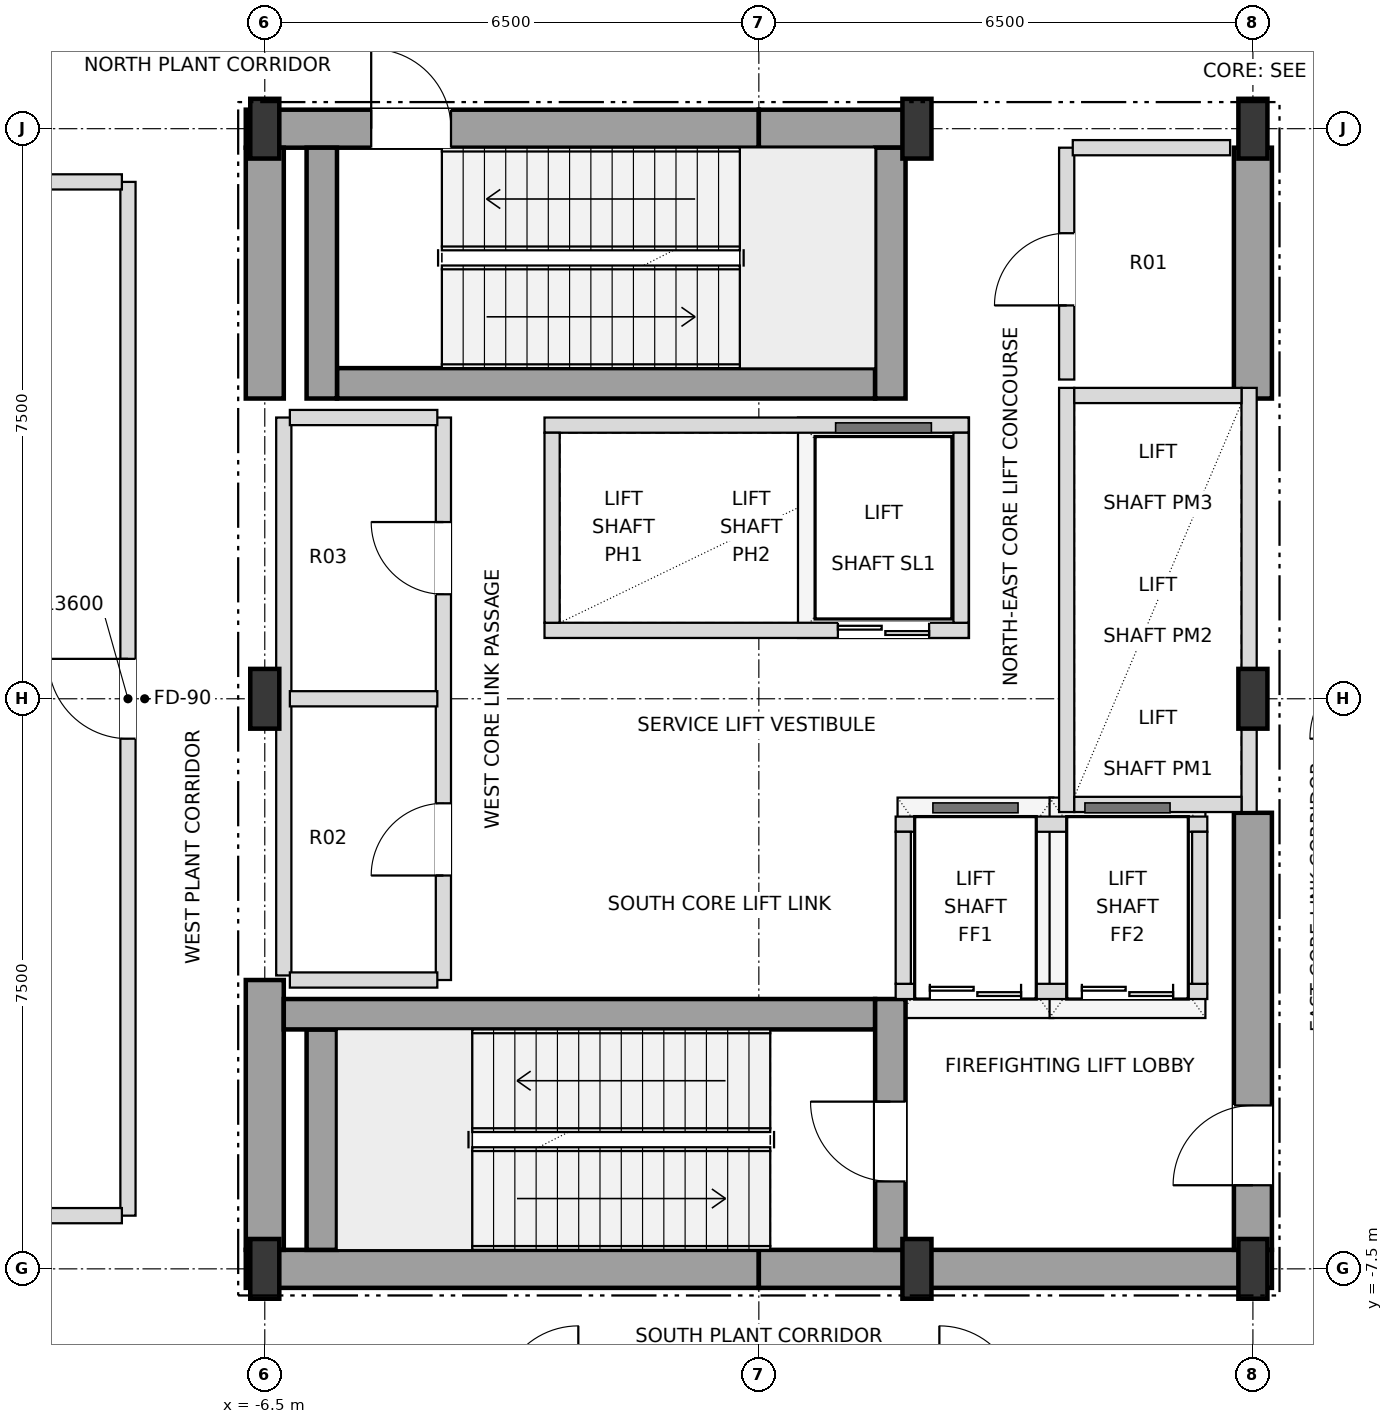
"""IFC4 building model, lengths in metres.
Left out: names, types, materials, properties, quantities, classifications, styles, units other than length and angle.
Written with IfcOpenShell. Run it as: python <this file> out.ifc"""

import sys

from ifc_helpers import new_model, si_unit, direction, frame, frame_2d, origin, origin_2d, place, context, subcontext, project, spatial, rectangle, i_section, extrude, element, fill, save


model = new_model("IFC4")
c1 = context("Model", 3, precision=1e-05, world=origin(), true_north=direction((0.0, 1.0)))
c2 = subcontext(c1, "Body", "Model", "MODEL_VIEW")
j1 = project(units=[si_unit("LENGTHUNIT", "METRE"), si_unit("PLANEANGLEUNIT", "RADIAN")], contexts=[c1])
p1 = place(None, origin())
s1 = spatial("IfcSite", under=j1, at=p1, CompositionType="ELEMENT")
p2 = place(p1, origin())
s2 = spatial("IfcBuilding", under=s1, at=p2, CompositionType="ELEMENT")
p3 = place(p2, frame((0.0, 0.0, 212.4)))
s3 = spatial("IfcBuildingStorey", under=s2, at=p3, CompositionType="ELEMENT", Elevation=212.4)
for number, where, z_axis, x_axis in (
    (1, (-6.5, -7.5, 0.0), (0.0, 0.0, 1.0), (1.0, 0.0, 0.0)),
    (2, (2.08, -7.5, 0.0), (0.0, 0.0, 1.0), (1.0, 0.0, 0.0)),
    (3, (6.5, -7.5, 0.0), (0.0, 0.0, 1.0), (1.0, 0.0, 0.0)),
    (4, (-6.5, 0.0, 0.0), (0.0, 0.0, 1.0), (1.0, 0.0, 0.0)),
    (5, (6.5, 0.0, 0.0), (0.0, 0.0, 1.0), (1.0, 0.0, 0.0)),
    (6, (-6.5, 7.5, 0.0), (0.0, 0.0, 1.0), (1.0, 0.0, 0.0)),
    (7, (2.08, 7.5, 0.0), (0.0, 0.0, 1.0), (1.0, 0.0, 0.0)),
    (8, (6.5, 7.5, 0.0), (0.0, 0.0, 1.0), (1.0, 0.0, 0.0)),
):
    element("IfcColumn", number, at=place(p3, frame(where, z_axis=z_axis, x_axis=x_axis)), inside=s3, PredefinedType="COLUMN", context=c2, shape_type="SweptSolid", body=[
        extrude(i_section(OverallWidth=0.382, OverallDepth=0.786, WebThickness=0.02, FlangeThickness=0.033, at=origin_2d()), origin(), (0.0, 0.0, 1.0), 5.4),
    ])
for number, where, z_axis, x_axis in (
    (9, (-6.75, -7.5, 0.0), (0.0, 0.0, 1.0), (1.0, 0.0, 0.0)),
    (10, (0.0, -7.5, 0.0), (0.0, 0.0, 1.0), (1.0, 0.0, 0.0)),
):
    element("IfcWall", number, at=place(p3, frame(where, z_axis=z_axis, x_axis=x_axis)), inside=s3, PredefinedType="SHEAR", context=c2, shape_type="SweptSolid", body=[
        extrude(rectangle(XDim=6.75, YDim=0.5, at=frame_2d((3.375, 0.0))), origin(), (0.0, 0.0, 1.0), 5.1),
    ])
p4 = place(p3, frame((-6.75, 7.5, 0.0), z_axis=(0.0, 0.0, 1.0), x_axis=(1.0, 0.0, 0.0)))
e11 = element("IfcWall", 11, at=p4, inside=s3, PredefinedType="SHEAR", context=c2, shape_type="SweptSolid", body=[
    extrude(rectangle(XDim=6.75, YDim=0.5, at=frame_2d((3.375, 0.0))), origin(), (0.0, 0.0, 1.0), 5.1),
])
p5 = place(p4, frame((1.65, 0.0, 0.0)))
e12 = element("IfcOpeningElement", 12, at=p5, cuts=e11, PredefinedType="OPENING", context=c2, shape_type="SweptSolid", body=[
    extrude(rectangle(XDim=1.05, YDim=2.15, at=frame_2d((0.525, 1.075))), frame((0.0, 0.26, 0.0), z_axis=(0.0, -1.0, 0.0), x_axis=(1.0, 0.0, 0.0)), (0.0, 0.0, 1.0), 0.52),
])
p6 = place(p3, frame((0.0, 7.5, 0.0), z_axis=(0.0, 0.0, 1.0), x_axis=(1.0, 0.0, 0.0)))
e13 = element("IfcWall", 13, at=p6, inside=s3, PredefinedType="SHEAR", context=c2, shape_type="SweptSolid", body=[
    extrude(rectangle(XDim=2.08, YDim=0.5, at=frame_2d((1.04, 0.0))), origin(), (0.0, 0.0, 1.0), 5.1),
])
p7 = place(p3, frame((-6.5, -7.25, 0.0), z_axis=(0.0, 0.0, 1.0), x_axis=(0.0, 1.0, 0.0)))
e14 = element("IfcWall", 14, at=p7, inside=s3, PredefinedType="SHEAR", context=c2, shape_type="SweptSolid", body=[
    extrude(rectangle(XDim=3.55, YDim=0.5, at=frame_2d((1.775, 0.0))), origin(), (0.0, 0.0, 1.0), 5.1),
])
p8 = place(p3, frame((-6.5, 3.95, 0.0), z_axis=(0.0, 0.0, 1.0), x_axis=(0.0, 1.0, 0.0)))
e15 = element("IfcWall", 15, at=p8, inside=s3, PredefinedType="SHEAR", context=c2, shape_type="SweptSolid", body=[
    extrude(rectangle(XDim=3.3, YDim=0.5, at=frame_2d((1.65, 0.0))), origin(), (0.0, 0.0, 1.0), 5.1),
])
p9 = place(p3, frame((6.5, -7.25, 0.0), z_axis=(0.0, 0.0, 1.0), x_axis=(0.0, 1.0, 0.0)))
e16 = element("IfcWall", 16, at=p9, inside=s3, PredefinedType="SHEAR", context=c2, shape_type="SweptSolid", body=[
    extrude(rectangle(XDim=5.75, YDim=0.5, at=frame_2d((2.875, 0.0))), origin(), (0.0, 0.0, 1.0), 5.1),
])
p10 = place(p9, frame((0.85, 0.0, 0.0)))
e17 = element("IfcOpeningElement", 17, at=p10, cuts=e16, PredefinedType="OPENING", context=c2, shape_type="SweptSolid", body=[
    extrude(rectangle(XDim=1.05, YDim=2.15, at=frame_2d((0.525, 1.075))), frame((0.0, 0.26, 0.0), z_axis=(0.0, -1.0, 0.0), x_axis=(1.0, 0.0, 0.0)), (0.0, 0.0, 1.0), 0.52),
])
p11 = place(p3, frame((6.5, 3.95, 0.0), z_axis=(0.0, 0.0, 1.0), x_axis=(0.0, 1.0, 0.0)))
e18 = element("IfcWall", 18, at=p11, inside=s3, PredefinedType="SHEAR", context=c2, shape_type="SweptSolid", body=[
    extrude(rectangle(XDim=3.3, YDim=0.5, at=frame_2d((1.65, 0.0))), origin(), (0.0, 0.0, 1.0), 5.1),
])
p12 = place(p3, frame((-5.75, -7.25, 0.0), z_axis=(0.0, 0.0, 1.0), x_axis=(0.0, 1.0, 0.0)))
e19 = element("IfcWall", 19, at=p12, inside=s3, PredefinedType="SHEAR", context=c2, shape_type="SweptSolid", body=[
    extrude(rectangle(XDim=2.9, YDim=0.4, at=frame_2d((1.45, 0.0))), origin(), (0.0, 0.0, 1.0), 5.1),
])
p13 = place(p3, frame((-6.25, -4.15, 0.0), z_axis=(0.0, 0.0, 1.0), x_axis=(1.0, 0.0, 0.0)))
e20 = element("IfcWall", 20, at=p13, inside=s3, PredefinedType="SHEAR", context=c2, shape_type="SweptSolid", body=[
    extrude(rectangle(XDim=7.78, YDim=0.4, at=frame_2d((3.89, 0.0))), origin(), (0.0, 0.0, 1.0), 5.1),
])
p14 = place(p3, frame((1.73, -7.25, 0.0), z_axis=(0.0, 0.0, 1.0), x_axis=(0.0, 1.0, 0.0)))
e21 = element("IfcWall", 21, at=p14, inside=s3, PredefinedType="SHEAR", context=c2, shape_type="SweptSolid", body=[
    extrude(rectangle(XDim=3.3, YDim=0.4, at=frame_2d((1.65, 0.0))), origin(), (0.0, 0.0, 1.0), 5.1),
])
p15 = place(p14, frame((0.9, 0.0, 0.0)))
e22 = element("IfcOpeningElement", 22, at=p15, cuts=e21, PredefinedType="OPENING", context=c2, shape_type="SweptSolid", body=[
    extrude(rectangle(XDim=1.05, YDim=2.15, at=frame_2d((0.525, 1.075))), frame((0.0, 0.21, 0.0), z_axis=(0.0, -1.0, 0.0), x_axis=(1.0, 0.0, 0.0)), (0.0, 0.0, 1.0), 0.42),
])
p16 = place(p3, frame((-5.55, 4.15, 0.0), z_axis=(0.0, 0.0, 1.0), x_axis=(1.0, 0.0, 0.0)))
e23 = element("IfcWall", 23, at=p16, inside=s3, PredefinedType="SHEAR", context=c2, shape_type="SweptSolid", body=[
    extrude(rectangle(XDim=7.08, YDim=0.4, at=frame_2d((3.54, 0.0))), origin(), (0.0, 0.0, 1.0), 5.1),
])
for number, where, z_axis, x_axis in (
    (24, (1.73, 3.95, 0.0), (0.0, 0.0, 1.0), (0.0, 1.0, 0.0)),
    (25, (-5.75, 3.95, 0.0), (0.0, 0.0, 1.0), (0.0, 1.0, 0.0)),
):
    element("IfcWall", number, at=place(p3, frame(where, z_axis=z_axis, x_axis=x_axis)), inside=s3, PredefinedType="SHEAR", context=c2, shape_type="SweptSolid", body=[
        extrude(rectangle(XDim=3.3, YDim=0.4, at=frame_2d((1.65, 0.0))), origin(), (0.0, 0.0, 1.0), 5.1),
    ])
p17 = place(p3, frame((4.05, -1.49, 0.0), z_axis=(0.0, 0.0, 1.0), x_axis=(0.0, 1.0, 0.0)))
e26 = element("IfcWall", 26, at=p17, inside=s3, PredefinedType="SOLIDWALL", context=c2, shape_type="SweptSolid", body=[
    extrude(rectangle(XDim=5.58, YDim=0.2, at=frame_2d((2.79, 0.0))), origin(), (0.0, 0.0, 1.0), 5.1),
])
p18 = place(p3, frame((6.45, -1.49, 0.0), z_axis=(0.0, 0.0, 1.0), x_axis=(0.0, 1.0, 0.0)))
e27 = element("IfcWall", 27, at=p18, inside=s3, PredefinedType="SOLIDWALL", context=c2, shape_type="SweptSolid", body=[
    extrude(rectangle(XDim=5.58, YDim=0.2, at=frame_2d((2.79, 0.0))), origin(), (0.0, 0.0, 1.0), 4.153),
])
for number, where, z_axis, x_axis in (
    (28, (4.15, -1.39, 0.0), (0.0, 0.0, 1.0), (1.0, 0.0, 0.0)),
    (29, (4.15, 3.99, 0.0), (0.0, 0.0, 1.0), (1.0, 0.0, 0.0)),
):
    element("IfcWall", number, at=place(p3, frame(where, z_axis=z_axis, x_axis=x_axis)), inside=s3, PredefinedType="SOLIDWALL", context=c2, shape_type="SweptSolid", body=[
        extrude(rectangle(XDim=2.2, YDim=0.2, at=frame_2d((1.1, 0.0))), origin(), (0.0, 0.0, 1.0), 5.1),
    ])
p19 = place(p3, frame((-2.82, 0.9, 0.0), z_axis=(0.0, 0.0, 1.0), x_axis=(1.0, 0.0, 0.0)))
e30 = element("IfcWall", 30, at=p19, inside=s3, PredefinedType="SOLIDWALL", context=c2, shape_type="SweptSolid", body=[
    extrude(rectangle(XDim=5.58, YDim=0.2, at=frame_2d((2.79, 0.0))), origin(), (0.0, 0.0, 1.0), 5.1),
])
p20 = place(p19, frame((3.86, 0.0, 0.0)))
e31 = element("IfcOpeningElement", 31, at=p20, cuts=e30, PredefinedType="OPENING", context=c2, shape_type="SweptSolid", body=[
    extrude(rectangle(XDim=1.2, YDim=2.2, at=frame_2d((0.6, 1.1))), frame((0.0, 0.11, 0.0), z_axis=(0.0, -1.0, 0.0), x_axis=(1.0, 0.0, 0.0)), (0.0, 0.0, 1.0), 0.22),
])
p21 = place(p3, frame((-2.82, 3.6, 0.0), z_axis=(0.0, 0.0, 1.0), x_axis=(1.0, 0.0, 0.0)))
e32 = element("IfcWall", 32, at=p21, inside=s3, PredefinedType="SOLIDWALL", context=c2, shape_type="SweptSolid", body=[
    extrude(rectangle(XDim=5.58, YDim=0.2, at=frame_2d((2.79, 0.0))), origin(), (0.0, 0.0, 1.0), 5.1),
])
for number, where, z_axis, x_axis in (
    (33, (-2.72, 1.0, 0.0), (0.0, 0.0, 1.0), (0.0, 1.0, 0.0)),
    (34, (2.66, 1.0, 0.0), (0.0, 0.0, 1.0), (0.0, 1.0, 0.0)),
):
    element("IfcWall", number, at=place(p3, frame(where, z_axis=z_axis, x_axis=x_axis)), inside=s3, PredefinedType="SOLIDWALL", context=c2, shape_type="SweptSolid", body=[
        extrude(rectangle(XDim=2.5, YDim=0.2, at=frame_2d((1.25, 0.0))), origin(), (0.0, 0.0, 1.0), 5.1),
    ])
p22 = place(p3, frame((1.8, -3.85, 0.0), z_axis=(0.0, 0.0, 1.0), x_axis=(1.0, 0.0, 0.0)))
e35 = element("IfcWall", 35, at=p22, inside=s3, PredefinedType="SOLIDWALL", context=c2, shape_type="SweptSolid", body=[
    extrude(rectangle(XDim=4.1, YDim=0.2, at=frame_2d((2.05, 0.0))), origin(), (0.0, 0.0, 1.0), 5.1),
])
p23 = place(p22, frame((0.45, 0.0, 0.0)))
e36 = element("IfcOpeningElement", 36, at=p23, cuts=e35, PredefinedType="OPENING", context=c2, shape_type="SweptSolid", body=[
    extrude(rectangle(XDim=1.2, YDim=2.2, at=frame_2d((0.6, 1.1))), frame((0.0, 0.11, 0.0), z_axis=(0.0, -1.0, 0.0), x_axis=(1.0, 0.0, 0.0)), (0.0, 0.0, 1.0), 0.22),
])
p24 = place(p22, frame((2.45, 0.0, 0.0)))
e37 = element("IfcOpeningElement", 37, at=p24, cuts=e35, PredefinedType="OPENING", context=c2, shape_type="SweptSolid", body=[
    extrude(rectangle(XDim=1.2, YDim=2.2, at=frame_2d((0.6, 1.1))), frame((0.0, 0.11, 0.0), z_axis=(0.0, -1.0, 0.0), x_axis=(1.0, 0.0, 0.0)), (0.0, 0.0, 1.0), 0.22),
])
p25 = place(p3, frame((1.8, -1.65, 0.0), z_axis=(0.0, 0.0, 1.0), x_axis=(1.0, 0.0, 0.0)))
e38 = element("IfcWall", 38, at=p25, inside=s3, PredefinedType="SOLIDWALL", context=c2, shape_type="SweptSolid", body=[
    extrude(rectangle(XDim=4.1, YDim=0.2, at=frame_2d((2.05, 0.0))), origin(), (0.0, 0.0, 1.0), 5.1),
])
for number, where, z_axis, x_axis in (
    (39, (1.9, -3.75, 0.0), (0.0, 0.0, 1.0), (0.0, 1.0, 0.0)),
    (40, (5.8, -3.75, 0.0), (0.0, 0.0, 1.0), (0.0, 1.0, 0.0)),
):
    element("IfcWall", number, at=place(p3, frame(where, z_axis=z_axis, x_axis=x_axis)), inside=s3, PredefinedType="SOLIDWALL", context=c2, shape_type="SweptSolid", body=[
        extrude(rectangle(XDim=2.0, YDim=0.2, at=frame_2d((1.0, 0.0))), origin(), (0.0, 0.0, 1.0), 5.1),
    ])
p26 = place(p3, frame((-8.3, -6.8, 0.0), z_axis=(0.0, 0.0, 1.0), x_axis=(0.0, 1.0, 0.0)))
e41 = element("IfcWall", 41, at=p26, inside=s3, PredefinedType="SOLIDWALL", context=c2, shape_type="SweptSolid", body=[
    extrude(rectangle(XDim=13.6, YDim=0.2, at=frame_2d((6.8, 0.0))), origin(), (0.0, 0.0, 1.0), 5.1),
])
p27 = place(p26, frame((6.275, 0.0, 0.0)))
e42 = element("IfcOpeningElement", 42, at=p27, cuts=e41, PredefinedType="OPENING", context=c2, shape_type="SweptSolid", body=[
    extrude(rectangle(XDim=1.05, YDim=2.15, at=frame_2d((0.525, 1.075))), frame((0.0, 0.11, 0.0), z_axis=(0.0, -1.0, 0.0), x_axis=(1.0, 0.0, 0.0)), (0.0, 0.0, 1.0), 0.22),
])
p28 = place(p3, frame((-6.25, -3.64, 0.0), z_axis=(0.0, 0.0, 1.0), x_axis=(0.0, 1.0, 0.0)))
e43 = element("IfcWall", 43, at=p28, inside=s3, PredefinedType="SOLIDWALL", context=c2, shape_type="SweptSolid", body=[
    extrude(rectangle(XDim=7.34, YDim=0.2, at=frame_2d((3.67, 0.0))), origin(), (0.0, 0.0, 1.0), 4.153),
])
p29 = place(p3, frame((-4.15, -3.7, 0.0), z_axis=(0.0, 0.0, 1.0), x_axis=(0.0, 1.0, 0.0)))
e44 = element("IfcWall", 44, at=p29, inside=s3, PredefinedType="SOLIDWALL", context=c2, shape_type="SweptSolid", body=[
    extrude(rectangle(XDim=7.4, YDim=0.2, at=frame_2d((3.7, 0.0))), origin(), (0.0, 0.0, 1.0), 5.1),
])
p30 = place(p29, frame((1.375, 0.0, 0.0)))
e45 = element("IfcOpeningElement", 45, at=p30, cuts=e44, PredefinedType="OPENING", context=c2, shape_type="SweptSolid", body=[
    extrude(rectangle(XDim=0.95, YDim=2.15, at=frame_2d((0.475, 1.075))), frame((0.0, 0.11, 0.0), z_axis=(0.0, -1.0, 0.0), x_axis=(1.0, 0.0, 0.0)), (0.0, 0.0, 1.0), 0.22),
])
p31 = place(p29, frame((5.075, 0.0, 0.0)))
e46 = element("IfcOpeningElement", 46, at=p31, cuts=e44, PredefinedType="OPENING", context=c2, shape_type="SweptSolid", body=[
    extrude(rectangle(XDim=0.95, YDim=2.15, at=frame_2d((0.475, 1.075))), frame((0.0, 0.11, 0.0), z_axis=(0.0, -1.0, 0.0), x_axis=(1.0, 0.0, 0.0)), (0.0, 0.0, 1.0), 0.22),
])
p32 = place(p3, frame((4.05, 4.2, 0.0), z_axis=(0.0, 0.0, 1.0), x_axis=(0.0, 1.0, 0.0)))
e47 = element("IfcWall", 47, at=p32, inside=s3, PredefinedType="SOLIDWALL", context=c2, shape_type="SweptSolid", body=[
    extrude(rectangle(XDim=3.05, YDim=0.2, at=frame_2d((1.525, 0.0))), origin(), (0.0, 0.0, 1.0), 5.1),
])
p33 = place(p32, frame((0.975, 0.0, 0.0)))
e48 = element("IfcOpeningElement", 48, at=p33, cuts=e47, PredefinedType="OPENING", context=c2, shape_type="SweptSolid", body=[
    extrude(rectangle(XDim=0.95, YDim=2.15, at=frame_2d((0.475, 1.075))), frame((0.0, 0.11, 0.0), z_axis=(0.0, -1.0, 0.0), x_axis=(1.0, 0.0, 0.0)), (0.0, 0.0, 1.0), 0.22),
])
p34 = place(p3, frame((-16.195, -6.8, 0.0), z_axis=(0.0, 0.0, 1.0), x_axis=(1.0, 0.0, 0.0)))
e49 = element("IfcWall", 49, at=p34, inside=s3, PredefinedType="SOLIDWALL", context=c2, shape_type="SweptSolid", body=[
    extrude(rectangle(XDim=7.815, YDim=0.2, at=frame_2d((3.908, 0.0))), origin(), (0.0, 0.0, 1.0), 4.738),
])
for number, where, z_axis, x_axis in (
    (50, (-6.17, -3.7, 0.0), (0.0, 0.0, 1.0), (1.0, 0.0, 0.0)),
    (51, (-6.17, 0.0, 0.0), (0.0, 0.0, 1.0), (1.0, 0.0, 0.0)),
    (52, (-6.17, 3.7, 0.0), (0.0, 0.0, 1.0), (1.0, 0.0, 0.0)),
):
    element("IfcWall", number, at=place(p3, frame(where, z_axis=z_axis, x_axis=x_axis)), inside=s3, PredefinedType="SOLIDWALL", context=c2, shape_type="SweptSolid", body=[
        extrude(rectangle(XDim=1.94, YDim=0.2, at=frame_2d((0.97, 0.0))), origin(), (0.0, 0.0, 1.0), 5.1),
    ])
p35 = place(p3, frame((-16.195, 6.8, 0.0), z_axis=(0.0, 0.0, 1.0), x_axis=(1.0, 0.0, 0.0)))
e53 = element("IfcWall", 53, at=p35, inside=s3, PredefinedType="SOLIDWALL", context=c2, shape_type="SweptSolid", body=[
    extrude(rectangle(XDim=7.815, YDim=0.2, at=frame_2d((3.908, 0.0))), origin(), (0.0, 0.0, 1.0), 4.738),
])
p36 = place(p3, frame((4.13, 7.25, 0.0), z_axis=(0.0, 0.0, 1.0), x_axis=(1.0, 0.0, 0.0)))
e54 = element("IfcWall", 54, at=p36, inside=s3, PredefinedType="SOLIDWALL", context=c2, shape_type="SweptSolid", body=[
    extrude(rectangle(XDim=2.07, YDim=0.2, at=frame_2d((1.035, 0.0))), origin(), (0.0, 0.0, 1.0), 4.153),
])
p37 = place(p10, origin())
e55 = element("IfcDoor", 55, at=p37, inside=s3, OperationType="SINGLE_SWING_LEFT", PredefinedType="DOOR", context=c2, shape_type="SweptSolid", body=[
    extrude(rectangle(XDim=1.05, YDim=2.15, at=frame_2d((0.525, 1.075))), frame((0.0, 0.025, 0.0), z_axis=(0.0, -1.0, 0.0), x_axis=(1.0, 0.0, 0.0)), (0.0, 0.0, 1.0), 0.05),
])
fill(e17, e55)
p38 = place(p15, origin())
e56 = element("IfcDoor", 56, at=p38, inside=s3, OperationType="SINGLE_SWING_RIGHT", PredefinedType="DOOR", context=c2, shape_type="SweptSolid", body=[
    extrude(rectangle(XDim=1.05, YDim=2.15, at=frame_2d((0.525, 1.075))), frame((0.0, 0.025, 0.0), z_axis=(0.0, -1.0, 0.0), x_axis=(1.0, 0.0, 0.0)), (0.0, 0.0, 1.0), 0.05),
])
fill(e22, e56)
p39 = place(p5, origin())
e57 = element("IfcDoor", 57, at=p39, inside=s3, OperationType="SINGLE_SWING_LEFT", PredefinedType="DOOR", context=c2, shape_type="SweptSolid", body=[
    extrude(rectangle(XDim=1.05, YDim=2.15, at=frame_2d((0.525, 1.075))), frame((0.0, 0.025, 0.0), z_axis=(0.0, -1.0, 0.0), x_axis=(1.0, 0.0, 0.0)), (0.0, 0.0, 1.0), 0.05),
])
fill(e12, e57)
p40 = place(p20, origin())
e58 = element("IfcDoor", 58, at=p40, inside=s3, OperationType="DOUBLE_DOOR_SLIDING", PredefinedType="DOOR", context=c2, shape_type="SweptSolid", body=[
    extrude(rectangle(XDim=1.2, YDim=2.2, at=frame_2d((0.6, 1.1))), frame((0.0, 0.025, 0.0), z_axis=(0.0, -1.0, 0.0), x_axis=(1.0, 0.0, 0.0)), (0.0, 0.0, 1.0), 0.05),
])
fill(e31, e58)
p41 = place(p23, origin())
e59 = element("IfcDoor", 59, at=p41, inside=s3, OperationType="DOUBLE_DOOR_SLIDING", PredefinedType="DOOR", context=c2, shape_type="SweptSolid", body=[
    extrude(rectangle(XDim=1.2, YDim=2.2, at=frame_2d((0.6, 1.1))), frame((0.0, 0.025, 0.0), z_axis=(0.0, -1.0, 0.0), x_axis=(1.0, 0.0, 0.0)), (0.0, 0.0, 1.0), 0.05),
])
fill(e36, e59)
p42 = place(p24, origin())
e60 = element("IfcDoor", 60, at=p42, inside=s3, OperationType="DOUBLE_DOOR_SLIDING", PredefinedType="DOOR", context=c2, shape_type="SweptSolid", body=[
    extrude(rectangle(XDim=1.2, YDim=2.2, at=frame_2d((0.6, 1.1))), frame((0.0, 0.025, 0.0), z_axis=(0.0, -1.0, 0.0), x_axis=(1.0, 0.0, 0.0)), (0.0, 0.0, 1.0), 0.05),
])
fill(e37, e60)
p43 = place(p30, origin())
e61 = element("IfcDoor", 61, at=p43, inside=s3, OperationType="SINGLE_SWING_LEFT", PredefinedType="DOOR", context=c2, shape_type="SweptSolid", body=[
    extrude(rectangle(XDim=0.95, YDim=2.15, at=frame_2d((0.475, 1.075))), frame((0.0, 0.025, 0.0), z_axis=(0.0, -1.0, 0.0), x_axis=(1.0, 0.0, 0.0)), (0.0, 0.0, 1.0), 0.05),
])
fill(e45, e61)
p44 = place(p31, origin())
e62 = element("IfcDoor", 62, at=p44, inside=s3, OperationType="SINGLE_SWING_RIGHT", PredefinedType="DOOR", context=c2, shape_type="SweptSolid", body=[
    extrude(rectangle(XDim=0.95, YDim=2.15, at=frame_2d((0.475, 1.075))), frame((0.0, 0.025, 0.0), z_axis=(0.0, -1.0, 0.0), x_axis=(1.0, 0.0, 0.0)), (0.0, 0.0, 1.0), 0.05),
])
fill(e46, e62)
p45 = place(p33, origin())
e63 = element("IfcDoor", 63, at=p45, inside=s3, OperationType="SINGLE_SWING_LEFT", PredefinedType="DOOR", context=c2, shape_type="SweptSolid", body=[
    extrude(rectangle(XDim=0.95, YDim=2.15, at=frame_2d((0.475, 1.075))), frame((0.0, 0.025, 0.0), z_axis=(0.0, -1.0, 0.0), x_axis=(1.0, 0.0, 0.0)), (0.0, 0.0, 1.0), 0.05),
])
fill(e48, e63)
p46 = place(p27, origin())
e64 = element("IfcDoor", 64, at=p46, inside=s3, OperationType="SINGLE_SWING_RIGHT", PredefinedType="DOOR", context=c2, shape_type="SweptSolid", body=[
    extrude(rectangle(XDim=1.05, YDim=2.15, at=frame_2d((0.525, 1.075))), frame((0.0, 0.025, 0.0), z_axis=(0.0, -1.0, 0.0), x_axis=(1.0, 0.0, 0.0)), (0.0, 0.0, 1.0), 0.05),
])
fill(e42, e64)
save(model, sys.argv[1])
